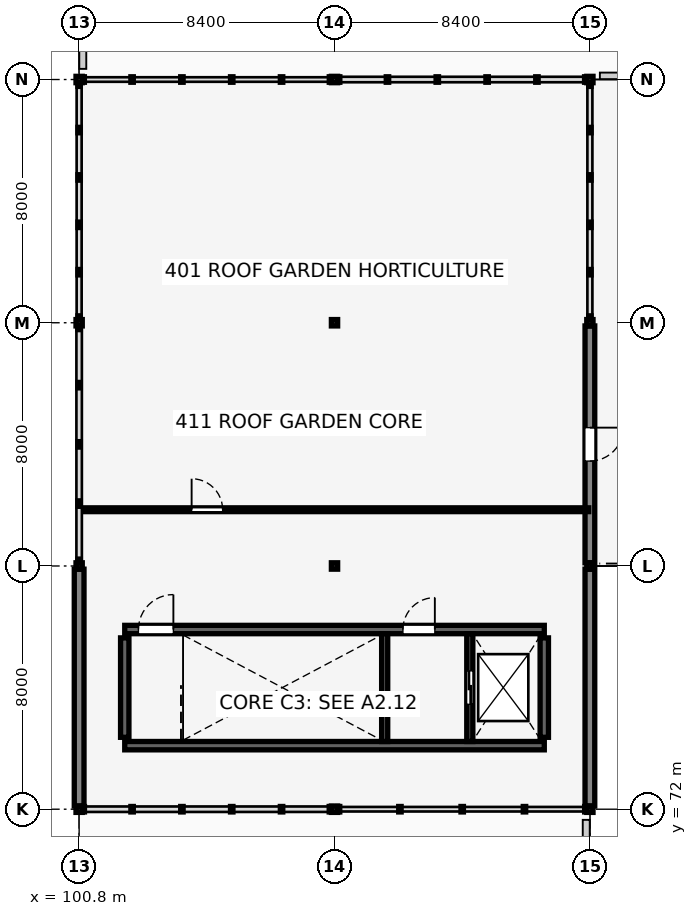
"""IFC4 building model, lengths in metres.
Left out: names, types, materials, properties, quantities, classifications, styles, units other than length and angle.
Written with IfcOpenShell. Run it as: python <this file> out.ifc"""

import sys

from ifc_helpers import new_model, si_unit, direction, frame, frame_2d, origin, origin_2d, place, context, subcontext, project, spatial, rectangle, i_section, extrude, element, fill, save


model = new_model("IFC4")
c1 = context("Model", 3, precision=1e-05, world=origin(), true_north=direction((0.0, 1.0)))
c2 = subcontext(c1, "Body", "Model", "MODEL_VIEW")
j1 = project(units=[si_unit("LENGTHUNIT", "METRE"), si_unit("PLANEANGLEUNIT", "RADIAN")], contexts=[c1])
p1 = place(None, origin())
s1 = spatial("IfcSite", under=j1, at=p1, CompositionType="ELEMENT")
p2 = place(p1, origin())
s2 = spatial("IfcBuilding", under=s1, at=p2, CompositionType="ELEMENT")
p3 = place(p2, frame((0.0, 0.0, 17.2)))
s3 = spatial("IfcBuildingStorey", under=s2, at=p3, CompositionType="ELEMENT", Elevation=17.2)
p4 = place(p3, frame((102.3, 74.09, 0.0), z_axis=(0.0, 0.0, 1.0), x_axis=(1.0, 0.0, 0.0)))
e1 = element("IfcWall", 1, at=p4, inside=s3, PredefinedType="SHEAR", context=c2, shape_type="SweptSolid", body=[
    extrude(rectangle(XDim=13.8, YDim=0.275, at=frame_2d((6.9, 0.0))), origin(), (0.0, 0.0, 1.0), 3.59),
])
p5 = place(p3, frame((102.3, 77.91, 0.0), z_axis=(0.0, 0.0, 1.0), x_axis=(1.0, 0.0, 0.0)))
e2 = element("IfcWall", 2, at=p5, inside=s3, PredefinedType="SHEAR", context=c2, shape_type="SweptSolid", body=[
    extrude(rectangle(XDim=13.8, YDim=0.275, at=frame_2d((6.9, 0.0))), origin(), (0.0, 0.0, 1.0), 3.59),
])
p6 = place(p5, frame((0.45, 0.0, 0.0), z_axis=(0.0, 0.0, 1.0), x_axis=(1.0, 0.0, 0.0)))
e3 = element("IfcOpeningElement", 3, at=p6, cuts=e2, PredefinedType="OPENING", context=c2, shape_type="SweptSolid", body=[
    extrude(rectangle(XDim=1.15, YDim=2.15, at=frame_2d((0.575, 1.075))), frame((0.0, 0.147, 0.0), z_axis=(0.0, -1.0, 0.0), x_axis=(1.0, 0.0, 0.0)), (0.0, 0.0, 1.0), 0.295),
])
p7 = place(p5, frame((9.15, 0.0, 0.0), z_axis=(0.0, 0.0, 1.0), x_axis=(1.0, 0.0, 0.0)))
e4 = element("IfcOpeningElement", 4, at=p7, cuts=e2, PredefinedType="OPENING", context=c2, shape_type="SweptSolid", body=[
    extrude(rectangle(XDim=1.05, YDim=2.15, at=frame_2d((0.525, 1.075))), frame((0.0, 0.147, 0.0), z_axis=(0.0, -1.0, 0.0), x_axis=(1.0, 0.0, 0.0)), (0.0, 0.0, 1.0), 0.295),
])
for number, where, z_axis, x_axis in (
    (5, (102.3, 74.365, 0.0), (0.0, 0.0, 1.0), (0.0, 1.0, 0.0)),
    (6, (116.1, 74.365, 0.0), (0.0, 0.0, 1.0), (0.0, 1.0, 0.0)),
):
    element("IfcWall", number, at=place(p3, frame(where, z_axis=z_axis, x_axis=x_axis)), inside=s3, PredefinedType="SHEAR", context=c2, shape_type="SweptSolid", body=[
        extrude(rectangle(XDim=3.27, YDim=0.275, at=frame_2d((1.635, 0.0))), origin(), (0.0, 0.0, 1.0), 3.59),
    ])
p8 = place(p3, frame((100.8, 72.0, 0.0), z_axis=(0.0, 0.0, 1.0), x_axis=(1.0, 0.0, 0.0)))
e7 = element("IfcColumn", 7, at=p8, inside=s3, PredefinedType="COLUMN", context=c2, shape_type="SweptSolid", body=[
    extrude(i_section(OverallWidth=0.206, OverallDepth=0.21, WebThickness=0.01, FlangeThickness=0.014, FilletRadius=0.01, at=origin_2d()), origin(), (0.0, 0.0, 1.0), 7.15),
])
p9 = place(p3, frame((100.8, 80.0, 0.0), z_axis=(0.0, 0.0, 1.0), x_axis=(1.0, 0.0, 0.0)))
e8 = element("IfcColumn", 8, at=p9, inside=s3, PredefinedType="COLUMN", context=c2, shape_type="SweptSolid", body=[
    extrude(i_section(OverallWidth=0.206, OverallDepth=0.21, WebThickness=0.01, FlangeThickness=0.014, FilletRadius=0.01, at=origin_2d()), origin(), (0.0, 0.0, 1.0), 6.5),
])
p10 = place(p3, frame((100.8, 88.0, 0.0), z_axis=(0.0, 0.0, 1.0), x_axis=(1.0, 0.0, 0.0)))
e9 = element("IfcColumn", 9, at=p10, inside=s3, PredefinedType="COLUMN", context=c2, shape_type="SweptSolid", body=[
    extrude(i_section(OverallWidth=0.206, OverallDepth=0.21, WebThickness=0.01, FlangeThickness=0.014, FilletRadius=0.01, at=origin_2d()), origin(), (0.0, 0.0, 1.0), 4.55),
])
for number, where, z_axis, x_axis in (
    (10, (100.8, 96.0, 0.0), (0.0, 0.0, 1.0), (1.0, 0.0, 0.0)),
    (11, (109.2, 72.0, 0.0), (0.0, 0.0, 1.0), (1.0, 0.0, 0.0)),
    (12, (109.2, 80.0, 0.0), (0.0, 0.0, 1.0), (1.0, 0.0, 0.0)),
    (13, (109.2, 88.0, 0.0), (0.0, 0.0, 1.0), (1.0, 0.0, 0.0)),
    (14, (109.2, 96.0, 0.0), (0.0, 0.0, 1.0), (1.0, 0.0, 0.0)),
    (15, (117.6, 72.0, 0.0), (0.0, 0.0, 1.0), (1.0, 0.0, 0.0)),
    (16, (117.6, 80.0, 0.0), (0.0, 0.0, 1.0), (1.0, 0.0, 0.0)),
    (17, (117.6, 88.0, 0.0), (0.0, 0.0, 1.0), (1.0, 0.0, 0.0)),
    (18, (117.6, 96.0, 0.0), (0.0, 0.0, 1.0), (1.0, 0.0, 0.0)),
):
    element("IfcColumn", number, at=place(p3, frame(where, z_axis=z_axis, x_axis=x_axis)), inside=s3, PredefinedType="COLUMN", context=c2, shape_type="SweptSolid", body=[
        extrude(i_section(OverallWidth=0.206, OverallDepth=0.21, WebThickness=0.01, FlangeThickness=0.014, FilletRadius=0.01, at=origin_2d()), origin(), (0.0, 0.0, 1.0), 3.59),
    ])
p11 = place(p3, frame((117.6, 72.105, 0.0), z_axis=(0.0, 0.0, 1.0), x_axis=(0.0, 1.0, 0.0)))
e19 = element("IfcWall", 19, at=p11, inside=s3, PredefinedType="SOLIDWALL", context=c2, shape_type="SweptSolid", body=[
    extrude(rectangle(XDim=7.791, YDim=0.32, at=frame_2d((3.895, 0.0))), origin(), (0.0, 0.0, 1.0), 3.29),
])
p12 = place(p3, frame((117.6, 80.105, 0.0), z_axis=(0.0, 0.0, 1.0), x_axis=(0.0, 1.0, 0.0)))
e20 = element("IfcWall", 20, at=p12, inside=s3, PredefinedType="SOLIDWALL", context=c2, shape_type="SweptSolid", body=[
    extrude(rectangle(XDim=7.791, YDim=0.32, at=frame_2d((3.895, 0.0))), origin(), (0.0, 0.0, 1.0), 3.29),
])
p13 = place(p12, frame((4.445, 0.0, 0.0), z_axis=(0.0, 0.0, 1.0), x_axis=(-1.0, 0.0, 0.0)))
e21 = element("IfcOpeningElement", 21, at=p13, cuts=e20, PredefinedType="OPENING", context=c2, shape_type="SweptSolid", body=[
    extrude(rectangle(XDim=1.1, YDim=2.15, at=frame_2d((0.55, 1.075))), frame((0.0, 0.17, 0.0), z_axis=(0.0, -1.0, 0.0), x_axis=(1.0, 0.0, 0.0)), (0.0, 0.0, 1.0), 0.34),
])
p14 = place(p3, frame((100.8, 72.105, 0.0), z_axis=(0.0, 0.0, 1.0), x_axis=(0.0, 1.0, 0.0)))
e22 = element("IfcWall", 22, at=p14, inside=s3, PredefinedType="SOLIDWALL", context=c2, shape_type="SweptSolid", body=[
    extrude(rectangle(XDim=7.791, YDim=0.32, at=frame_2d((3.895, 0.0))), origin(), (0.0, 0.0, 1.0), 3.29),
])
p15 = place(p3, frame((151.2, 96.12, 0.0), z_axis=(0.0, 0.0, 1.0), x_axis=(-1.0, 0.0, 0.0)))
e23 = element("IfcWall", 23, at=p15, inside=s3, PredefinedType="PARAPET", context=c2, shape_type="SweptSolid", body=[
    extrude(rectangle(XDim=33.272, YDim=0.215, at=frame_2d((16.636, 0.0))), origin(), (0.0, 0.0, 1.0), 1.05),
])
p16 = place(p3, frame((100.92, 96.35, 0.0), z_axis=(0.0, 0.0, 1.0), x_axis=(0.0, 1.0, 0.0)))
e24 = element("IfcWall", 24, at=p16, inside=s3, PredefinedType="PARAPET", context=c2, shape_type="SweptSolid", body=[
    extrude(rectangle(XDim=15.53, YDim=0.23, at=frame_2d((7.765, 0.0))), origin(), (0.0, 0.0, 1.0), 1.05),
])
p17 = place(p3, frame((117.48, 71.65, 0.0), z_axis=(0.0, 0.0, 1.0), x_axis=(0.0, -1.0, 0.0)))
e25 = element("IfcWall", 25, at=p17, inside=s3, PredefinedType="PARAPET", context=c2, shape_type="SweptSolid", body=[
    extrude(rectangle(XDim=7.53, YDim=0.23, at=frame_2d((3.765, 0.0))), origin(), (0.0, 0.0, 1.0), 1.05),
])
p18 = place(p3, frame((110.85, 74.228, 0.0), z_axis=(0.0, 0.0, 1.0), x_axis=(0.0, 1.0, 0.0)))
e26 = element("IfcWall", 26, at=p18, inside=s3, PredefinedType="SHEAR", context=c2, shape_type="SweptSolid", body=[
    extrude(rectangle(XDim=3.545, YDim=0.2, at=frame_2d((1.772, 0.0))), origin(), (0.0, 0.0, 1.0), 3.59),
])
p19 = place(p3, frame((113.65, 74.228, 0.0), z_axis=(0.0, 0.0, 1.0), x_axis=(0.0, 1.0, 0.0)))
e27 = element("IfcWall", 27, at=p19, inside=s3, PredefinedType="SHEAR", context=c2, shape_type="SweptSolid", body=[
    extrude(rectangle(XDim=3.545, YDim=0.2, at=frame_2d((1.772, 0.0))), origin(), (0.0, 0.0, 1.0), 3.59),
])
p20 = place(p19, frame((1.222, 0.0, 0.0), z_axis=(0.0, 0.0, 1.0), x_axis=(1.0, 0.0, 0.0)))
e28 = element("IfcOpeningElement", 28, at=p20, cuts=e27, PredefinedType="OPENING", context=c2, shape_type="SweptSolid", body=[
    extrude(rectangle(XDim=1.1, YDim=2.15, at=frame_2d((0.55, 1.075))), frame((0.0, 0.11, 0.0), z_axis=(0.0, -1.0, 0.0), x_axis=(1.0, 0.0, 0.0)), (0.0, 0.0, 1.0), 0.22),
])
p21 = place(p3, frame((100.84, 81.85, 0.0), z_axis=(0.0, 0.0, 1.0), x_axis=(1.0, 0.0, 0.0)))
e29 = element("IfcWall", 29, at=p21, inside=s3, PredefinedType="PARTITIONING", context=c2, shape_type="SweptSolid", body=[
    extrude(rectangle(XDim=16.72, YDim=0.125, at=frame_2d((8.36, 0.0))), origin(), (0.0, 0.0, 1.0), 3.59),
])
p22 = place(p21, frame((3.66, 0.0, 0.0), z_axis=(0.0, 0.0, 1.0), x_axis=(1.0, 0.0, 0.0)))
e30 = element("IfcOpeningElement", 30, at=p22, cuts=e29, PredefinedType="OPENING", context=c2, shape_type="SweptSolid", body=[
    extrude(rectangle(XDim=1.02, YDim=2.16, at=frame_2d((0.51, 1.08))), frame((0.0, 0.073, 0.0), z_axis=(0.0, -1.0, 0.0), x_axis=(1.0, 0.0, 0.0)), (0.0, 0.0, 1.0), 0.145),
])
p23 = place(p13, origin())
e31 = element("IfcDoor", 31, at=p23, inside=s3, OperationType="SINGLE_SWING_LEFT", PredefinedType="DOOR", context=c2, shape_type="SweptSolid", body=[
    extrude(rectangle(XDim=1.1, YDim=2.15, at=frame_2d((0.55, 1.075))), frame((0.0, 0.025, 0.0), z_axis=(0.0, -1.0, 0.0), x_axis=(1.0, 0.0, 0.0)), (0.0, 0.0, 1.0), 0.05),
])
fill(e21, e31)
p24 = place(p6, origin())
e32 = element("IfcDoor", 32, at=p24, inside=s3, OperationType="SINGLE_SWING_RIGHT", PredefinedType="DOOR", context=c2, shape_type="SweptSolid", body=[
    extrude(rectangle(XDim=1.15, YDim=2.15, at=frame_2d((0.575, 1.075))), frame((0.0, 0.025, 0.0), z_axis=(0.0, -1.0, 0.0), x_axis=(1.0, 0.0, 0.0)), (0.0, 0.0, 1.0), 0.05),
])
fill(e3, e32)
p25 = place(p7, origin())
e33 = element("IfcDoor", 33, at=p25, inside=s3, OperationType="SINGLE_SWING_RIGHT", PredefinedType="DOOR", context=c2, shape_type="SweptSolid", body=[
    extrude(rectangle(XDim=1.05, YDim=2.15, at=frame_2d((0.525, 1.075))), frame((0.0, 0.025, 0.0), z_axis=(0.0, -1.0, 0.0), x_axis=(1.0, 0.0, 0.0)), (0.0, 0.0, 1.0), 0.05),
])
fill(e4, e33)
p26 = place(p20, origin())
e34 = element("IfcDoor", 34, at=p26, inside=s3, OperationType="DOUBLE_DOOR_SLIDING", PredefinedType="DOOR", context=c2, shape_type="SweptSolid", body=[
    extrude(rectangle(XDim=1.1, YDim=2.15, at=frame_2d((0.55, 1.075))), frame((0.0, 0.025, 0.0), z_axis=(0.0, -1.0, 0.0), x_axis=(1.0, 0.0, 0.0)), (0.0, 0.0, 1.0), 0.05),
])
fill(e28, e34)
p27 = place(p22, origin())
e35 = element("IfcDoor", 35, at=p27, inside=s3, OperationType="SINGLE_SWING_LEFT", PredefinedType="DOOR", context=c2, shape_type="SweptSolid", body=[
    extrude(rectangle(XDim=1.02, YDim=2.16, at=frame_2d((0.51, 1.08))), frame((0.0, 0.025, 0.0), z_axis=(0.0, -1.0, 0.0), x_axis=(1.0, 0.0, 0.0)), (0.0, 0.0, 1.0), 0.05),
])
fill(e30, e35)
save(model, sys.argv[1])
